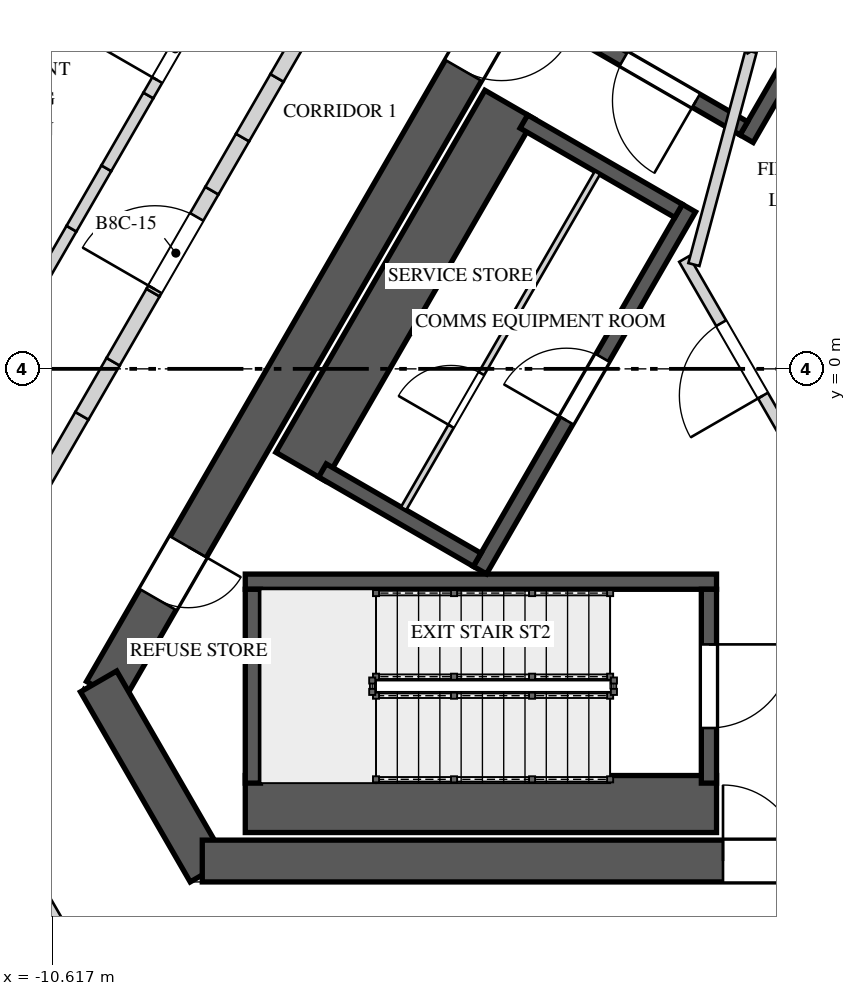
"""IFC4 building model, lengths in metres.
Left out: names, types, materials, properties, quantities, classifications, styles, units other than length and angle.
Written with IfcOpenShell. Run it as: python <this file> out.ifc"""

import sys

from ifc_helpers import new_model, si_unit, direction, frame, frame_2d, origin, place, context, subcontext, project, spatial, polyline, rectangle, outline, extrude, element, fill, save


model = new_model("IFC4")
c1 = context("Model", 3, precision=1e-05, world=origin(), true_north=direction((0.0, 1.0)))
c2 = subcontext(c1, "Body", "Model", "MODEL_VIEW")
j1 = project(units=[si_unit("LENGTHUNIT", "METRE"), si_unit("PLANEANGLEUNIT", "RADIAN")], contexts=[c1])
p1 = place(None, origin())
s1 = spatial("IfcSite", under=j1, at=p1, CompositionType="ELEMENT")
p2 = place(p1, origin())
s2 = spatial("IfcBuilding", under=s1, at=p2, CompositionType="ELEMENT")
p3 = place(p2, frame((0.0, 0.0, 348.4)))
s3 = spatial("IfcBuildingStorey", under=s2, at=p3, CompositionType="ELEMENT", Elevation=348.4)
p4 = place(p3, frame((-1.285, 10.725, 0.0), z_axis=(0.0, 0.0, 1.0), x_axis=(-0.499994590896, -0.86602852671, 0.0)))
e1 = element("IfcWall", 1, at=p4, inside=s3, PredefinedType="SHEAR", context=c2, shape_type="SweptSolid", body=[
    extrude(rectangle(XDim=17.292, YDim=0.55, at=frame_2d((8.646, 0.0))), origin(), (0.0, 0.0, 1.0), 4.0),
])
p5 = place(p4, frame((6.851, 0.0, 0.0)))
e2 = element("IfcOpeningElement", 2, at=p5, cuts=e1, PredefinedType="OPENING", context=c2, shape_type="SweptSolid", body=[
    extrude(rectangle(XDim=1.0, YDim=2.4, at=frame_2d((0.5, 1.2))), frame((0.0, 0.285, 0.0), z_axis=(0.0, -1.0, 0.0), x_axis=(1.0, 0.0, 0.0)), (0.0, 0.0, 1.0), 0.57),
])
p6 = place(p4, frame((15.089, 0.0, 0.0)))
e3 = element("IfcOpeningElement", 3, at=p6, cuts=e1, PredefinedType="OPENING", context=c2, shape_type="SweptSolid", body=[
    extrude(rectangle(XDim=0.8, YDim=2.1, at=frame_2d((0.4, 1.05))), frame((0.0, 0.285, 0.0), z_axis=(0.0, -1.0, 0.0), x_axis=(1.0, 0.0, 0.0)), (0.0, 0.0, 1.0), 0.57),
])
p7 = place(p3, frame((-10.01, -4.113, 0.0), z_axis=(0.0, 0.0, 1.0), x_axis=(0.499995765644, -0.866027848477, 0.0)))
e4 = element("IfcWall", 4, at=p7, inside=s3, PredefinedType="SHEAR", context=c2, shape_type="SweptSolid", body=[
    extrude(rectangle(XDim=2.887, YDim=0.55, at=frame_2d((1.443, 0.0))), origin(), (0.0, 0.0, 1.0), 4.0),
])
p8 = place(p3, frame((-8.646, -6.475, 0.0), z_axis=(0.0, 0.0, 1.0), x_axis=(1.0, 0.0, 0.0)))
e5 = element("IfcWall", 5, at=p8, inside=s3, PredefinedType="SHEAR", context=c2, shape_type="SweptSolid", body=[
    extrude(rectangle(XDim=17.292, YDim=0.55, at=frame_2d((8.646, 0.0))), origin(), (0.0, 0.0, 1.0), 4.0),
])
p9 = place(p8, frame((6.851, 0.0, 0.0)))
e6 = element("IfcOpeningElement", 6, at=p9, cuts=e5, PredefinedType="OPENING", context=c2, shape_type="SweptSolid", body=[
    extrude(rectangle(XDim=1.0, YDim=2.4, at=frame_2d((0.5, 1.2))), frame((0.0, 0.285, 0.0), z_axis=(0.0, -1.0, 0.0), x_axis=(1.0, 0.0, 0.0)), (0.0, 0.0, 1.0), 0.57),
])
p10 = place(p8, frame((15.089, 0.0, 0.0)))
e7 = element("IfcOpeningElement", 7, at=p10, cuts=e5, PredefinedType="OPENING", context=c2, shape_type="SweptSolid", body=[
    extrude(rectangle(XDim=0.8, YDim=2.1, at=frame_2d((0.4, 1.05))), frame((0.0, 0.285, 0.0), z_axis=(0.0, -1.0, 0.0), x_axis=(1.0, 0.0, 0.0)), (0.0, 0.0, 1.0), 0.57),
])
p11 = place(p3, frame((1.615, 8.397, 0.0), z_axis=(0.0, 0.0, 1.0), x_axis=(-0.500009909098, -0.866019682689, 0.0)))
e8 = element("IfcWall", 8, at=p11, inside=s3, PredefinedType="SOLIDWALL", context=c2, shape_type="SweptSolid", body=[
    extrude(rectangle(XDim=6.2, YDim=0.2, at=frame_2d((3.1, 0.0))), origin(), (0.0, 0.0, 1.0), 3.65),
])
p12 = place(p3, frame((-1.521, 3.165, 0.0), z_axis=(0.0, 0.0, 1.0), x_axis=(-0.866030925526, 0.499990435942, 0.0)))
e9 = element("IfcWall", 9, at=p12, inside=s3, PredefinedType="SOLIDWALL", context=c2, shape_type="SweptSolid", body=[
    extrude(rectangle(XDim=2.55, YDim=0.2, at=frame_2d((1.275, 0.0))), origin(), (0.0, 0.0, 1.0), 3.65),
])
p13 = place(p12, frame((0.725, 0.0, 0.0)))
e10 = element("IfcOpeningElement", 10, at=p13, cuts=e9, PredefinedType="OPENING", context=c2, shape_type="SweptSolid", body=[
    extrude(rectangle(XDim=1.1, YDim=2.4, at=frame_2d((0.55, 1.2))), frame((0.0, 0.11, 0.0), z_axis=(0.0, -1.0, 0.0), x_axis=(1.0, 0.0, 0.0)), (0.0, 0.0, 1.0), 0.22),
])
p14 = place(p3, frame((-8.08, -5.725, 0.0), z_axis=(0.0, 0.0, 1.0), x_axis=(1.0, 0.0, 0.0)))
e11 = element("IfcWall", 11, at=p14, inside=s3, PredefinedType="SOLIDWALL", context=c2, shape_type="SweptSolid", body=[
    extrude(rectangle(XDim=6.2, YDim=0.75, at=frame_2d((3.1, 0.0))), origin(), (0.0, 0.0, 1.0), 3.65),
])
p15 = place(p3, frame((-8.08, -2.8, 0.0), z_axis=(0.0, 0.0, 1.0), x_axis=(1.0, 0.0, 0.0)))
e12 = element("IfcWall", 12, at=p15, inside=s3, PredefinedType="SOLIDWALL", context=c2, shape_type="SweptSolid", body=[
    extrude(rectangle(XDim=6.2, YDim=0.2, at=frame_2d((3.1, 0.0))), origin(), (0.0, 0.0, 1.0), 3.65),
])
p16 = place(p3, frame((-7.98, -2.9, 0.0), z_axis=(0.0, 0.0, 1.0), x_axis=(0.0, -1.0, 0.0)))
e13 = element("IfcWall", 13, at=p16, inside=s3, PredefinedType="SOLIDWALL", context=c2, shape_type="SweptSolid", body=[
    extrude(rectangle(XDim=2.55, YDim=0.2, at=frame_2d((1.275, 0.0))), origin(), (0.0, 0.0, 1.0), 3.65),
])
p17 = place(p3, frame((-1.98, -2.9, 0.0), z_axis=(0.0, 0.0, 1.0), x_axis=(0.0, -1.0, 0.0)))
e14 = element("IfcWall", 14, at=p17, inside=s3, PredefinedType="SOLIDWALL", context=c2, shape_type="SweptSolid", body=[
    extrude(rectangle(XDim=2.55, YDim=0.2, at=frame_2d((1.275, 0.0))), origin(), (0.0, 0.0, 1.0), 3.65),
])
p18 = place(p17, frame((0.725, 0.0, 0.0)))
e15 = element("IfcOpeningElement", 15, at=p18, cuts=e14, PredefinedType="OPENING", context=c2, shape_type="SweptSolid", body=[
    extrude(rectangle(XDim=1.1, YDim=2.4, at=frame_2d((0.55, 1.2))), frame((0.0, 0.11, 0.0), z_axis=(0.0, -1.0, 0.0), x_axis=(1.0, 0.0, 0.0)), (0.0, 0.0, 1.0), 0.22),
])
p19 = place(p3, frame((-4.993, -2.648, 0.0), z_axis=(0.0, 0.0, 1.0), x_axis=(0.499996545922, 0.866027397988, 0.0)))
e16 = element("IfcWall", 16, at=p19, inside=s3, PredefinedType="SOLIDWALL", context=c2, shape_type="SweptSolid", body=[
    extrude(rectangle(XDim=5.5, YDim=0.2, at=frame_2d((2.75, 0.0))), origin(), (0.0, 0.0, 1.0), 3.65),
])
p20 = place(p19, frame((2.275, 0.0, 0.0)))
e17 = element("IfcOpeningElement", 17, at=p20, cuts=e16, PredefinedType="OPENING", context=c2, shape_type="SweptSolid", body=[
    extrude(rectangle(XDim=0.95, YDim=2.4, at=frame_2d((0.475, 1.2))), frame((0.0, 0.11, 0.0), z_axis=(0.0, -1.0, 0.0), x_axis=(1.0, 0.0, 0.0)), (0.0, 0.0, 1.0), 0.22),
])
p21 = place(p3, frame((-4.603, 3.477, 0.0), z_axis=(0.0, 0.0, 1.0), x_axis=(-0.500015767406, -0.866016300277, 0.0)))
e18 = element("IfcWall", 18, at=p21, inside=s3, PredefinedType="SOLIDWALL", context=c2, shape_type="SweptSolid", body=[
    extrude(rectangle(XDim=5.5, YDim=0.75, at=frame_2d((2.75, 0.0))), origin(), (0.0, 0.0, 1.0), 3.65),
])
p22 = place(p3, frame((-2.38, 2.078, 0.0), z_axis=(0.0, 0.0, 1.0), x_axis=(-0.866061024631, 0.499938297808, 0.0)))
e19 = element("IfcWall", 19, at=p22, inside=s3, PredefinedType="SOLIDWALL", context=c2, shape_type="SweptSolid", body=[
    extrude(rectangle(XDim=2.35, YDim=0.2, at=frame_2d((1.175, 0.0))), origin(), (0.0, 0.0, 1.0), 3.65),
])
p23 = place(p3, frame((-5.03, -2.512, 0.0), z_axis=(0.0, 0.0, 1.0), x_axis=(-0.866016039709, 0.500016218704, 0.0)))
e20 = element("IfcWall", 20, at=p23, inside=s3, PredefinedType="SOLIDWALL", context=c2, shape_type="SweptSolid", body=[
    extrude(rectangle(XDim=2.35, YDim=0.2, at=frame_2d((1.175, 0.0))), origin(), (0.0, 0.0, 1.0), 3.65),
])
p24 = place(p3, frame((-5.997, -1.838, 0.0), z_axis=(0.0, 0.0, 1.0), x_axis=(0.500005610874, 0.86602216432, 0.0)))
e21 = element("IfcWall", 21, at=p24, inside=s3, PredefinedType="PARTITIONING", context=c2, shape_type="SweptSolid", body=[
    extrude(rectangle(XDim=5.1, YDim=0.08, at=frame_2d((2.55, 0.0))), origin(), (0.0, 0.0, 1.0), 3.65),
])
p25 = place(p24, frame((1.25, 0.0, 0.0)))
e22 = element("IfcOpeningElement", 22, at=p25, cuts=e21, PredefinedType="OPENING", context=c2, shape_type="SweptSolid", body=[
    extrude(rectangle(XDim=0.8, YDim=2.1, at=frame_2d((0.4, 1.05))), frame((0.0, 0.05, 0.0), z_axis=(0.0, -1.0, 0.0), x_axis=(1.0, 0.0, 0.0)), (0.0, 0.0, 1.0), 0.1),
])
p26 = place(p3, frame((-0.744, -1.261, 0.0), z_axis=(0.0, 0.0, 1.0), x_axis=(-0.500004234368, 0.866022959057, 0.0)))
e23 = element("IfcWall", 23, at=p26, inside=s3, PredefinedType="PARTITIONING", context=c2, shape_type="SweptSolid", body=[
    extrude(rectangle(XDim=3.125, YDim=0.15, at=frame_2d((1.562, 0.0))), origin(), (0.0, 0.0, 1.0), 3.65),
])
p27 = place(p26, frame((1.05, 0.0, 0.0)))
e24 = element("IfcOpeningElement", 24, at=p27, cuts=e23, PredefinedType="OPENING", context=c2, shape_type="SweptSolid", body=[
    extrude(rectangle(XDim=1.1, YDim=2.4, at=frame_2d((0.55, 1.2))), frame((0.0, 0.085, 0.0), z_axis=(0.0, -1.0, 0.0), x_axis=(1.0, 0.0, 0.0)), (0.0, 0.0, 1.0), 0.17),
])
p28 = place(p3, frame((-2.178, 1.372, 0.0), z_axis=(0.0, 0.0, 1.0), x_axis=(0.258808958833, 0.96592852884, 0.0)))
e25 = element("IfcWall", 25, at=p28, inside=s3, PredefinedType="PARTITIONING", context=c2, shape_type="SweptSolid", body=[
    extrude(rectangle(XDim=2.903, YDim=0.15, at=frame_2d((1.451, 0.0))), origin(), (0.0, 0.0, 1.0), 3.65),
])
p29 = place(p3, frame((-1.51, 4.215, 0.0), z_axis=(0.0, 0.0, 1.0), x_axis=(0.866085525409, 0.49989585183, 0.0)))
e26 = element("IfcWall", 26, at=p29, inside=s3, PredefinedType="PARTITIONING", context=c2, shape_type="SweptSolid", body=[
    extrude(rectangle(XDim=1.3, YDim=0.15, at=frame_2d((0.65, 0.0))), origin(), (0.0, 0.0, 1.0), 3.65),
])
p30 = place(p3, frame((-11.409, 0.039, 0.0), z_axis=(0.0, 0.0, 1.0), x_axis=(0.499969202016, 0.866043184279, 0.0)))
e27 = element("IfcWall", 27, at=p30, inside=s3, PredefinedType="PARTITIONING", context=c2, shape_type="SweptSolid", body=[
    extrude(rectangle(XDim=2.084, YDim=0.15, at=frame_2d((1.042, 0.0))), origin(), (0.0, 0.0, 1.0), 3.65),
])
p31 = place(p3, frame((-10.367, 1.844, 0.0), z_axis=(0.0, 0.0, 1.0), x_axis=(0.499945096919, 0.866057099772, 0.0)))
e28 = element("IfcWall", 28, at=p31, inside=s3, PredefinedType="PARTITIONING", context=c2, shape_type="SweptSolid", body=[
    extrude(rectangle(XDim=0.917, YDim=0.15, at=frame_2d((0.459, 0.0))), origin(), (0.0, 0.0, 1.0), 2.55),
])
p32 = place(p3, frame((-9.908, 2.639, 0.0), z_axis=(0.0, 0.0, 1.0), x_axis=(0.500009088543, 0.866020156448, 0.0)))
e29 = element("IfcWall", 29, at=p32, inside=s3, PredefinedType="PARTITIONING", context=c2, shape_type="SweptSolid", body=[
    extrude(rectangle(XDim=1.106, YDim=0.15, at=frame_2d((0.553, 0.0))), origin(), (0.0, 0.0, 1.0), 3.65),
])
p33 = place(p3, frame((-9.355, 3.597, 0.0), z_axis=(0.0, 0.0, 1.0), x_axis=(0.499990780478, 0.866030726613, 0.0)))
e30 = element("IfcWall", 30, at=p33, inside=s3, PredefinedType="PARTITIONING", context=c2, shape_type="SweptSolid", body=[
    extrude(outline(polyline([(0.0, 0.0), (1.234, 0.0), (1.234, 3.65), (0.881, 3.65), (0.881, 2.55), (0.0, 2.55), (0.0, 0.0)])), frame((0.0, 0.075, 0.0), z_axis=(0.0, -1.0, 0.0), x_axis=(1.0, 0.0, 0.0)), (0.0, 0.0, 1.0), 0.15),
])
p34 = place(p33, frame((0.234, 0.0, 0.0)))
e31 = element("IfcOpeningElement", 31, at=p34, cuts=e30, PredefinedType="OPENING", context=c2, shape_type="SweptSolid", body=[
    extrude(rectangle(XDim=0.95, YDim=2.4, at=frame_2d((0.475, 1.2))), frame((0.0, 0.085, 0.0), z_axis=(0.0, -1.0, 0.0), x_axis=(1.0, 0.0, 0.0)), (0.0, 0.0, 1.0), 0.17),
])
p35 = place(p3, frame((-9.844, -8.55, 0.0), z_axis=(0.0, 0.0, 1.0), x_axis=(-0.500003959331, 0.866023117852, 0.0)))
e32 = element("IfcWall", 32, at=p35, inside=s3, PredefinedType="SOLIDWALL", context=c2, shape_type="SweptSolid", body=[
    extrude(rectangle(XDim=3.003, YDim=0.2, at=frame_2d((1.501, 0.0))), origin(), (0.0, 0.0, 1.0), 3.65),
])
p36 = place(p3, frame((-12.326, -4.25, 0.0), z_axis=(0.0, 0.0, 1.0), x_axis=(0.499982771656, 0.866035350345, 0.0)))
e33 = element("IfcWall", 33, at=p36, inside=s3, PredefinedType="SOLIDWALL", context=c2, shape_type="SweptSolid", body=[
    extrude(rectangle(XDim=4.195, YDim=0.2, at=frame_2d((2.097, 0.0))), origin(), (0.0, 0.0, 1.0), 3.65),
])
p37 = place(p3, frame((-10.229, -0.617, 0.0), z_axis=(0.0, 0.0, 1.0), x_axis=(0.5001686003, 0.865928040471, 0.0)))
e34 = element("IfcWall", 34, at=p37, inside=s3, PredefinedType="SOLIDWALL", context=c2, shape_type="SweptSolid", body=[
    extrude(rectangle(XDim=0.821, YDim=0.2, at=frame_2d((0.411, 0.0))), origin(), (0.0, 0.0, 1.0), 2.95),
])
p38 = place(p3, frame((-9.819, 0.094, 0.0), z_axis=(0.0, 0.0, 1.0), x_axis=(0.499890179513, 0.866088799389, 0.0)))
e35 = element("IfcWall", 35, at=p38, inside=s3, PredefinedType="SOLIDWALL", context=c2, shape_type="SweptSolid", body=[
    extrude(rectangle(XDim=1.05, YDim=0.2, at=frame_2d((0.525, 0.0))), origin(), (0.0, 0.0, 1.0), 3.65),
])
p39 = place(p3, frame((-9.294, 1.003, 0.0), z_axis=(0.0, 0.0, 1.0), x_axis=(0.500054401891, 0.86599399256, 0.0)))
e36 = element("IfcWall", 36, at=p39, inside=s3, PredefinedType="SOLIDWALL", context=c2, shape_type="SweptSolid", body=[
    extrude(outline(polyline([(0.0, 0.0), (1.549, 0.0), (1.549, 2.55), (0.605, 2.55), (0.605, 3.65), (0.0, 3.65), (0.0, 0.0)])), frame((0.0, 0.1, 0.0), z_axis=(0.0, -1.0, 0.0), x_axis=(1.0, 0.0, 0.0)), (0.0, 0.0, 1.0), 0.2),
])
p40 = place(p39, frame((0.05, 0.0, 0.0)))
e37 = element("IfcOpeningElement", 37, at=p40, cuts=e36, PredefinedType="OPENING", context=c2, shape_type="SweptSolid", body=[
    extrude(rectangle(XDim=1.1, YDim=2.4, at=frame_2d((0.55, 1.2))), frame((0.0, 0.11, 0.0), z_axis=(0.0, -1.0, 0.0), x_axis=(1.0, 0.0, 0.0)), (0.0, 0.0, 1.0), 0.22),
])
p41 = place(p3, frame((-8.519, 2.344, 0.0), z_axis=(0.0, 0.0, 1.0), x_axis=(0.499914554297, 0.866074730264, 0.0)))
e38 = element("IfcWall", 38, at=p41, inside=s3, PredefinedType="SOLIDWALL", context=c2, shape_type="SweptSolid", body=[
    extrude(rectangle(XDim=0.807, YDim=0.2, at=frame_2d((0.403, 0.0))), origin(), (0.0, 0.0, 1.0), 3.65),
])
p42 = place(p3, frame((-8.116, 3.043, 0.0), z_axis=(0.0, 0.0, 1.0), x_axis=(0.499994660107, 0.866028486751, 0.0)))
e39 = element("IfcWall", 39, at=p42, inside=s3, PredefinedType="SOLIDWALL", context=c2, shape_type="SweptSolid", body=[
    extrude(rectangle(XDim=0.906, YDim=0.2, at=frame_2d((0.453, 0.0))), origin(), (0.0, 0.0, 1.0), 2.55),
])
p43 = place(p3, frame((-7.663, 3.828, 0.0), z_axis=(0.0, 0.0, 1.0), x_axis=(0.499955681623, 0.866050989499, 0.0)))
e40 = element("IfcWall", 40, at=p43, inside=s3, PredefinedType="SOLIDWALL", context=c2, shape_type="SweptSolid", body=[
    extrude(rectangle(XDim=1.238, YDim=0.2, at=frame_2d((0.619, 0.0))), origin(), (0.0, 0.0, 1.0), 3.65),
])
p44 = place(p13, origin())
e41 = element("IfcDoor", 41, at=p44, inside=s3, OperationType="SINGLE_SWING_RIGHT", PredefinedType="DOOR", context=c2, shape_type="SweptSolid", body=[
    extrude(rectangle(XDim=1.1, YDim=2.4, at=frame_2d((0.55, 1.2))), frame((0.0, 0.025, 0.0), z_axis=(0.0, -1.0, 0.0), x_axis=(1.0, 0.0, 0.0)), (0.0, 0.0, 1.0), 0.05),
])
fill(e10, e41)
p45 = place(p18, origin())
e42 = element("IfcDoor", 42, at=p45, inside=s3, OperationType="SINGLE_SWING_LEFT", PredefinedType="DOOR", context=c2, shape_type="SweptSolid", body=[
    extrude(rectangle(XDim=1.1, YDim=2.4, at=frame_2d((0.55, 1.2))), frame((0.0, 0.025, 0.0), z_axis=(0.0, -1.0, 0.0), x_axis=(1.0, 0.0, 0.0)), (0.0, 0.0, 1.0), 0.05),
])
fill(e15, e42)
p46 = place(p20, origin())
e43 = element("IfcDoor", 43, at=p46, inside=s3, OperationType="SINGLE_SWING_LEFT", PredefinedType="DOOR", context=c2, shape_type="SweptSolid", body=[
    extrude(rectangle(XDim=0.95, YDim=2.4, at=frame_2d((0.475, 1.2))), frame((0.0, 0.025, 0.0), z_axis=(0.0, -1.0, 0.0), x_axis=(1.0, 0.0, 0.0)), (0.0, 0.0, 1.0), 0.05),
])
fill(e17, e43)
p47 = place(p25, origin())
e44 = element("IfcDoor", 44, at=p47, inside=s3, OperationType="SINGLE_SWING_RIGHT", PredefinedType="DOOR", context=c2, shape_type="SweptSolid", body=[
    extrude(rectangle(XDim=0.8, YDim=2.1, at=frame_2d((0.4, 1.05))), frame((0.0, 0.025, 0.0), z_axis=(0.0, -1.0, 0.0), x_axis=(1.0, 0.0, 0.0)), (0.0, 0.0, 1.0), 0.05),
])
fill(e22, e44)
p48 = place(p27, origin())
e45 = element("IfcDoor", 45, at=p48, inside=s3, OperationType="SINGLE_SWING_LEFT", PredefinedType="DOOR", context=c2, shape_type="SweptSolid", body=[
    extrude(rectangle(XDim=1.1, YDim=2.4, at=frame_2d((0.55, 1.2))), frame((0.0, 0.025, 0.0), z_axis=(0.0, -1.0, 0.0), x_axis=(1.0, 0.0, 0.0)), (0.0, 0.0, 1.0), 0.05),
])
fill(e24, e45)
p49 = place(p5, origin())
e46 = element("IfcDoor", 46, at=p49, inside=s3, OperationType="SINGLE_SWING_RIGHT", PredefinedType="DOOR", context=c2, shape_type="SweptSolid", body=[
    extrude(rectangle(XDim=1.0, YDim=2.4, at=frame_2d((0.5, 1.2))), frame((0.0, 0.025, 0.0), z_axis=(0.0, -1.0, 0.0), x_axis=(1.0, 0.0, 0.0)), (0.0, 0.0, 1.0), 0.05),
])
fill(e2, e46)
p50 = place(p9, origin())
e47 = element("IfcDoor", 47, at=p50, inside=s3, OperationType="SINGLE_SWING_LEFT", PredefinedType="DOOR", context=c2, shape_type="SweptSolid", body=[
    extrude(rectangle(XDim=1.0, YDim=2.4, at=frame_2d((0.5, 1.2))), frame((0.0, 0.025, 0.0), z_axis=(0.0, -1.0, 0.0), x_axis=(1.0, 0.0, 0.0)), (0.0, 0.0, 1.0), 0.05),
])
fill(e6, e47)
p51 = place(p6, origin())
e48 = element("IfcDoor", 48, at=p51, inside=s3, OperationType="SINGLE_SWING_LEFT", PredefinedType="DOOR", context=c2, shape_type="SweptSolid", body=[
    extrude(rectangle(XDim=0.8, YDim=2.1, at=frame_2d((0.4, 1.05))), frame((0.0, 0.025, 0.0), z_axis=(0.0, -1.0, 0.0), x_axis=(1.0, 0.0, 0.0)), (0.0, 0.0, 1.0), 0.05),
])
fill(e3, e48)
p52 = place(p34, origin())
e49 = element("IfcDoor", 49, at=p52, inside=s3, OperationType="SINGLE_SWING_LEFT", PredefinedType="DOOR", context=c2, shape_type="SweptSolid", body=[
    extrude(rectangle(XDim=0.95, YDim=2.4, at=frame_2d((0.475, 1.2))), frame((0.0, 0.025, 0.0), z_axis=(0.0, -1.0, 0.0), x_axis=(1.0, 0.0, 0.0)), (0.0, 0.0, 1.0), 0.05),
])
fill(e31, e49)
p53 = place(p40, origin())
e50 = element("IfcDoor", 50, at=p53, inside=s3, OperationType="SINGLE_SWING_LEFT", PredefinedType="DOOR", context=c2, shape_type="SweptSolid", body=[
    extrude(rectangle(XDim=1.1, YDim=2.4, at=frame_2d((0.55, 1.2))), frame((0.0, 0.025, 0.0), z_axis=(0.0, -1.0, 0.0), x_axis=(1.0, 0.0, 0.0)), (0.0, 0.0, 1.0), 0.05),
])
fill(e37, e50)
save(model, sys.argv[1])
